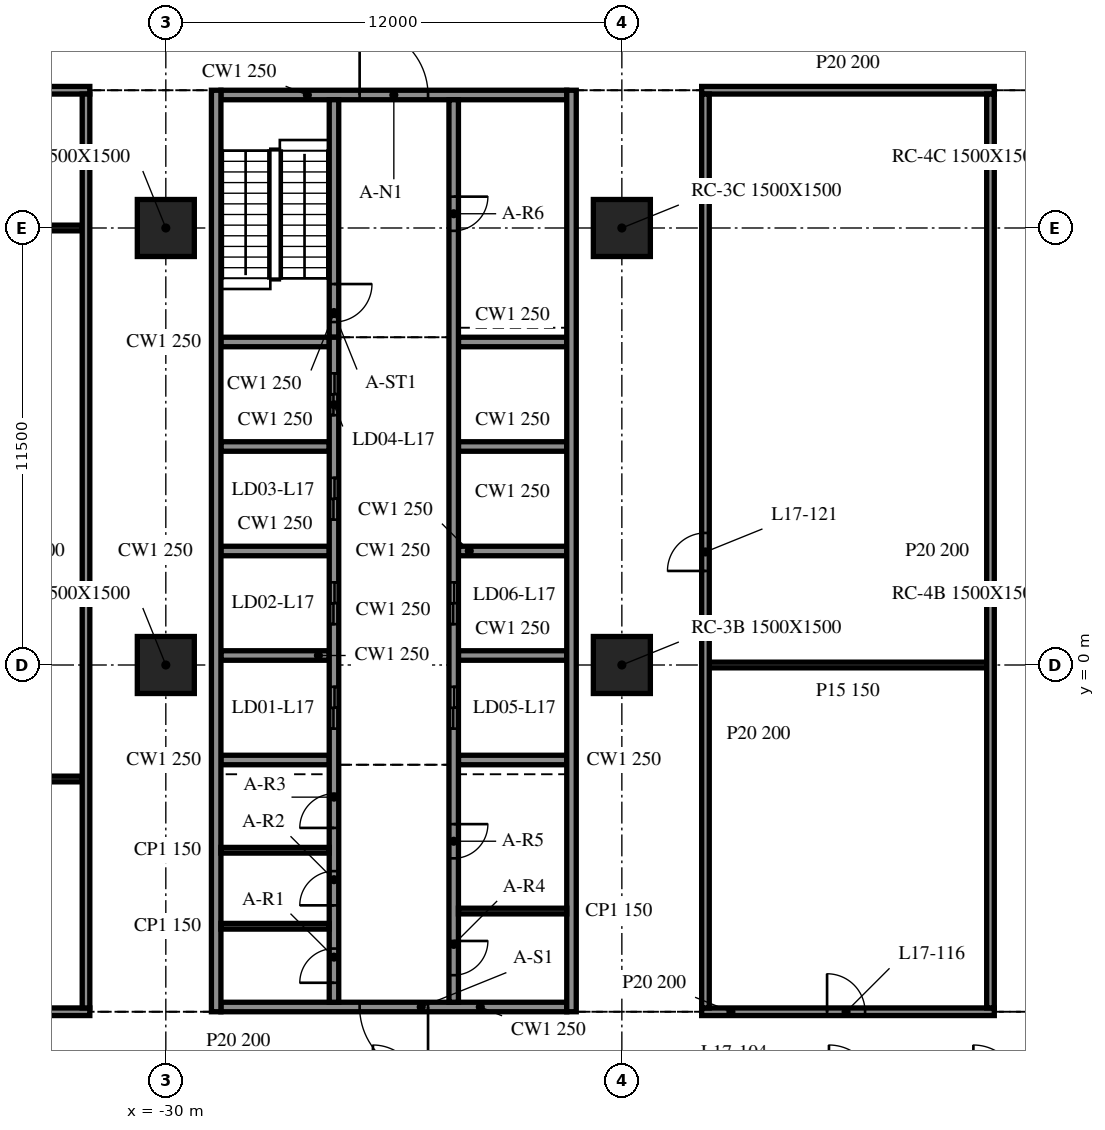
"""IFC4 building model, lengths in metres.
Left out: names, types, materials, properties, quantities, classifications, styles, units other than length and angle.
Written with IfcOpenShell. Run it as: python <this file> out.ifc"""

import sys

from ifc_helpers import new_model, si_unit, direction, frame, frame_2d, origin, origin_2d, place, context, subcontext, project, spatial, rectangle, extrude, element, fill, save


model = new_model("IFC4")
c1 = context("Model", 3, precision=1e-05, world=origin(), true_north=direction((0.0, 1.0)))
c2 = subcontext(c1, "Body", "Model", "MODEL_VIEW")
j1 = project(units=[si_unit("LENGTHUNIT", "METRE"), si_unit("PLANEANGLEUNIT", "RADIAN")], contexts=[c1])
p1 = place(None, origin())
s1 = spatial("IfcSite", under=j1, at=p1, CompositionType="ELEMENT")
p2 = place(p1, origin())
s2 = spatial("IfcBuilding", under=s1, at=p2, CompositionType="ELEMENT")
p3 = place(p2, frame((0.0, 0.0, 76.1)))
s3 = spatial("IfcBuildingStorey", under=s2, at=p3, CompositionType="ELEMENT", Elevation=76.1)
for number, where, z_axis, x_axis in (
    (1, (-30.0, 0.0, -0.34), (0.0, 0.0, 1.0), (1.0, 0.0, 0.0)),
    (2, (-30.0, 11.5, -0.34), (0.0, 0.0, 1.0), (1.0, 0.0, 0.0)),
    (3, (-18.0, 0.0, -0.34), (0.0, 0.0, 1.0), (1.0, 0.0, 0.0)),
    (4, (-18.0, 11.5, -0.34), (0.0, 0.0, 1.0), (1.0, 0.0, 0.0)),
):
    element("IfcColumn", number, at=place(p3, frame(where, z_axis=z_axis, x_axis=x_axis)), inside=s3, PredefinedType="COLUMN", context=c2, shape_type="SweptSolid", body=[
        extrude(rectangle(XDim=1.5, YDim=1.5, at=origin_2d()), origin(), (0.0, 0.0, 1.0), 4.09),
    ])
for number, where, z_axis, x_axis in (
    (5, (-28.675, 15.125, 0.0), (0.0, 0.0, 1.0), (0.0, -1.0, 0.0)),
    (6, (-19.325, -9.125, 0.0), (0.0, 0.0, 1.0), (0.0, 1.0, 0.0)),
):
    element("IfcWall", number, at=place(p3, frame(where, z_axis=z_axis, x_axis=x_axis)), inside=s3, PredefinedType="SOLIDWALL", context=c2, shape_type="SweptSolid", body=[
        extrude(rectangle(XDim=24.25, YDim=0.25, at=frame_2d((12.125, 0.0))), origin(), (0.0, 0.0, 1.0), 3.75),
    ])
p4 = place(p3, frame((-19.45, -9.0, 0.0), z_axis=(0.0, 0.0, 1.0), x_axis=(-1.0, 0.0, 0.0)))
e7 = element("IfcWall", 7, at=p4, inside=s3, PredefinedType="SOLIDWALL", context=c2, shape_type="SweptSolid", body=[
    extrude(rectangle(XDim=9.1, YDim=0.25, at=frame_2d((4.55, 0.0))), origin(), (0.0, 0.0, 1.0), 3.75),
])
p5 = place(p4, frame((3.65, 0.0, 0.0)))
e8 = element("IfcOpeningElement", 8, at=p5, cuts=e7, PredefinedType="OPENING", context=c2, shape_type="SweptSolid", body=[
    extrude(rectangle(XDim=1.8, YDim=2.1, at=frame_2d((0.9, 1.05))), frame((0.0, 0.135, 0.0), z_axis=(0.0, -1.0, 0.0), x_axis=(1.0, 0.0, 0.0)), (0.0, 0.0, 1.0), 0.27),
])
p6 = place(p3, frame((-28.55, 15.0, 0.0), z_axis=(0.0, 0.0, 1.0), x_axis=(1.0, 0.0, 0.0)))
e9 = element("IfcWall", 9, at=p6, inside=s3, PredefinedType="SOLIDWALL", context=c2, shape_type="SweptSolid", body=[
    extrude(rectangle(XDim=9.1, YDim=0.25, at=frame_2d((4.55, 0.0))), origin(), (0.0, 0.0, 1.0), 3.75),
])
p7 = place(p6, frame((3.65, 0.0, 0.0)))
e10 = element("IfcOpeningElement", 10, at=p7, cuts=e9, PredefinedType="OPENING", context=c2, shape_type="SweptSolid", body=[
    extrude(rectangle(XDim=1.8, YDim=2.1, at=frame_2d((0.9, 1.05))), frame((0.0, 0.135, 0.0), z_axis=(0.0, -1.0, 0.0), x_axis=(1.0, 0.0, 0.0)), (0.0, 0.0, 1.0), 0.27),
])
p8 = place(p3, frame((-25.575, -8.875, 0.0), z_axis=(0.0, 0.0, 1.0), x_axis=(0.0, 1.0, 0.0)))
e11 = element("IfcWall", 11, at=p8, inside=s3, PredefinedType="SOLIDWALL", context=c2, shape_type="SweptSolid", body=[
    extrude(rectangle(XDim=17.5, YDim=0.25, at=frame_2d((8.75, 0.0))), origin(), (0.0, 0.0, 1.0), 3.75),
])
p9 = place(p8, frame((7.2, 0.0, 0.0)))
e12 = element("IfcOpeningElement", 12, at=p9, cuts=e11, PredefinedType="OPENING", context=c2, shape_type="SweptSolid", body=[
    extrude(rectangle(XDim=1.1, YDim=2.1, at=frame_2d((0.55, 1.05))), frame((0.0, 0.135, 0.0), z_axis=(0.0, -1.0, 0.0), x_axis=(1.0, 0.0, 0.0)), (0.0, 0.0, 1.0), 0.27),
])
p10 = place(p8, frame((9.95, 0.0, 0.0)))
e13 = element("IfcOpeningElement", 13, at=p10, cuts=e11, PredefinedType="OPENING", context=c2, shape_type="SweptSolid", body=[
    extrude(rectangle(XDim=1.1, YDim=2.1, at=frame_2d((0.55, 1.05))), frame((0.0, 0.135, 0.0), z_axis=(0.0, -1.0, 0.0), x_axis=(1.0, 0.0, 0.0)), (0.0, 0.0, 1.0), 0.27),
])
p11 = place(p8, frame((12.7, 0.0, 0.0)))
e14 = element("IfcOpeningElement", 14, at=p11, cuts=e11, PredefinedType="OPENING", context=c2, shape_type="SweptSolid", body=[
    extrude(rectangle(XDim=1.1, YDim=2.1, at=frame_2d((0.55, 1.05))), frame((0.0, 0.135, 0.0), z_axis=(0.0, -1.0, 0.0), x_axis=(1.0, 0.0, 0.0)), (0.0, 0.0, 1.0), 0.27),
])
p12 = place(p8, frame((15.45, 0.0, 0.0)))
e15 = element("IfcOpeningElement", 15, at=p12, cuts=e11, PredefinedType="OPENING", context=c2, shape_type="SweptSolid", body=[
    extrude(rectangle(XDim=1.1, YDim=2.1, at=frame_2d((0.55, 1.05))), frame((0.0, 0.135, 0.0), z_axis=(0.0, -1.0, 0.0), x_axis=(1.0, 0.0, 0.0)), (0.0, 0.0, 1.0), 0.27),
])
p13 = place(p8, frame((0.512, 0.0, 0.0)))
e16 = element("IfcOpeningElement", 16, at=p13, cuts=e11, PredefinedType="OPENING", context=c2, shape_type="SweptSolid", body=[
    extrude(rectangle(XDim=0.9, YDim=2.1, at=frame_2d((0.45, 1.05))), frame((0.0, 0.135, 0.0), z_axis=(0.0, -1.0, 0.0), x_axis=(1.0, 0.0, 0.0)), (0.0, 0.0, 1.0), 0.27),
])
p14 = place(p8, frame((2.55, 0.0, 0.0)))
e17 = element("IfcOpeningElement", 17, at=p14, cuts=e11, PredefinedType="OPENING", context=c2, shape_type="SweptSolid", body=[
    extrude(rectangle(XDim=0.9, YDim=2.1, at=frame_2d((0.45, 1.05))), frame((0.0, 0.135, 0.0), z_axis=(0.0, -1.0, 0.0), x_axis=(1.0, 0.0, 0.0)), (0.0, 0.0, 1.0), 0.27),
])
p15 = place(p8, frame((4.587, 0.0, 0.0)))
e18 = element("IfcOpeningElement", 18, at=p15, cuts=e11, PredefinedType="OPENING", context=c2, shape_type="SweptSolid", body=[
    extrude(rectangle(XDim=0.9, YDim=2.1, at=frame_2d((0.45, 1.05))), frame((0.0, 0.135, 0.0), z_axis=(0.0, -1.0, 0.0), x_axis=(1.0, 0.0, 0.0)), (0.0, 0.0, 1.0), 0.27),
])
p16 = place(p3, frame((-25.575, 14.875, 0.0), z_axis=(0.0, 0.0, 1.0), x_axis=(0.0, -1.0, 0.0)))
e19 = element("IfcWall", 19, at=p16, inside=s3, PredefinedType="SOLIDWALL", context=c2, shape_type="SweptSolid", body=[
    extrude(rectangle(XDim=6.25, YDim=0.25, at=frame_2d((3.125, 0.0))), origin(), (0.0, 0.0, 1.0), 3.75),
])
p17 = place(p16, frame((4.85, 0.0, 0.0)))
e20 = element("IfcOpeningElement", 20, at=p17, cuts=e19, PredefinedType="OPENING", context=c2, shape_type="SweptSolid", body=[
    extrude(rectangle(XDim=1.0, YDim=2.1, at=frame_2d((0.5, 1.05))), frame((0.0, 0.135, 0.0), z_axis=(0.0, -1.0, 0.0), x_axis=(1.0, 0.0, 0.0)), (0.0, 0.0, 1.0), 0.27),
])
p18 = place(p3, frame((-22.425, 14.875, 0.0), z_axis=(0.0, 0.0, 1.0), x_axis=(0.0, -1.0, 0.0)))
e21 = element("IfcWall", 21, at=p18, inside=s3, PredefinedType="SOLIDWALL", context=c2, shape_type="SweptSolid", body=[
    extrude(rectangle(XDim=23.75, YDim=0.25, at=frame_2d((11.875, 0.0))), origin(), (0.0, 0.0, 1.0), 3.75),
])
p19 = place(p18, frame((15.45, 0.0, 0.0)))
e22 = element("IfcOpeningElement", 22, at=p19, cuts=e21, PredefinedType="OPENING", context=c2, shape_type="SweptSolid", body=[
    extrude(rectangle(XDim=1.1, YDim=2.1, at=frame_2d((0.55, 1.05))), frame((0.0, 0.135, 0.0), z_axis=(0.0, -1.0, 0.0), x_axis=(1.0, 0.0, 0.0)), (0.0, 0.0, 1.0), 0.27),
])
p20 = place(p18, frame((12.7, 0.0, 0.0)))
e23 = element("IfcOpeningElement", 23, at=p20, cuts=e21, PredefinedType="OPENING", context=c2, shape_type="SweptSolid", body=[
    extrude(rectangle(XDim=1.1, YDim=2.1, at=frame_2d((0.55, 1.05))), frame((0.0, 0.135, 0.0), z_axis=(0.0, -1.0, 0.0), x_axis=(1.0, 0.0, 0.0)), (0.0, 0.0, 1.0), 0.27),
])
p21 = place(p18, frame((22.137, 0.0, 0.0)))
e24 = element("IfcOpeningElement", 24, at=p21, cuts=e21, PredefinedType="OPENING", context=c2, shape_type="SweptSolid", body=[
    extrude(rectangle(XDim=0.9, YDim=2.1, at=frame_2d((0.45, 1.05))), frame((0.0, 0.135, 0.0), z_axis=(0.0, -1.0, 0.0), x_axis=(1.0, 0.0, 0.0)), (0.0, 0.0, 1.0), 0.27),
])
p22 = place(p18, frame((19.062, 0.0, 0.0)))
e25 = element("IfcOpeningElement", 25, at=p22, cuts=e21, PredefinedType="OPENING", context=c2, shape_type="SweptSolid", body=[
    extrude(rectangle(XDim=0.9, YDim=2.1, at=frame_2d((0.45, 1.05))), frame((0.0, 0.135, 0.0), z_axis=(0.0, -1.0, 0.0), x_axis=(1.0, 0.0, 0.0)), (0.0, 0.0, 1.0), 0.27),
])
p23 = place(p18, frame((2.55, 0.0, 0.0)))
e26 = element("IfcOpeningElement", 26, at=p23, cuts=e21, PredefinedType="OPENING", context=c2, shape_type="SweptSolid", body=[
    extrude(rectangle(XDim=0.9, YDim=2.1, at=frame_2d((0.45, 1.05))), frame((0.0, 0.135, 0.0), z_axis=(0.0, -1.0, 0.0), x_axis=(1.0, 0.0, 0.0)), (0.0, 0.0, 1.0), 0.27),
])
for number, where, z_axis, x_axis in (
    (27, (-28.55, -2.5, 0.0), (0.0, 0.0, 1.0), (1.0, 0.0, 0.0)),
    (28, (-28.55, 0.25, 0.0), (0.0, 0.0, 1.0), (1.0, 0.0, 0.0)),
    (29, (-28.55, 3.0, 0.0), (0.0, 0.0, 1.0), (1.0, 0.0, 0.0)),
    (30, (-28.55, 5.75, 0.0), (0.0, 0.0, 1.0), (1.0, 0.0, 0.0)),
    (31, (-28.55, 8.5, 0.0), (0.0, 0.0, 1.0), (1.0, 0.0, 0.0)),
    (32, (-22.3, -2.5, 0.0), (0.0, 0.0, 1.0), (1.0, 0.0, 0.0)),
    (33, (-22.3, 0.25, 0.0), (0.0, 0.0, 1.0), (1.0, 0.0, 0.0)),
    (34, (-22.3, 3.0, 0.0), (0.0, 0.0, 1.0), (1.0, 0.0, 0.0)),
    (35, (-22.3, 5.75, 0.0), (0.0, 0.0, 1.0), (1.0, 0.0, 0.0)),
    (36, (-22.3, 8.5, 0.0), (0.0, 0.0, 1.0), (1.0, 0.0, 0.0)),
):
    element("IfcWall", number, at=place(p3, frame(where, z_axis=z_axis, x_axis=x_axis)), inside=s3, PredefinedType="SOLIDWALL", context=c2, shape_type="SweptSolid", body=[
        extrude(rectangle(XDim=2.85, YDim=0.25, at=frame_2d((1.425, 0.0))), origin(), (0.0, 0.0, 1.0), 3.75),
    ])
for number, where, z_axis, x_axis in (
    (37, (-28.55, -6.875, 0.0), (0.0, 0.0, 1.0), (1.0, 0.0, 0.0)),
    (38, (-28.55, -4.875, 0.0), (0.0, 0.0, 1.0), (1.0, 0.0, 0.0)),
    (39, (-22.3, -6.475, 0.0), (0.0, 0.0, 1.0), (1.0, 0.0, 0.0)),
):
    element("IfcWall", number, at=place(p3, frame(where, z_axis=z_axis, x_axis=x_axis)), inside=s3, PredefinedType="PARTITIONING", context=c2, shape_type="SweptSolid", body=[
        extrude(rectangle(XDim=2.85, YDim=0.15, at=frame_2d((1.425, 0.0))), origin(), (0.0, 0.0, 1.0), 3.75),
    ])
p24 = place(p3, frame((-39.95, -9.125, 0.0), z_axis=(0.0, 0.0, 1.0), x_axis=(1.0, 0.0, 0.0)))
e40 = element("IfcWall", 40, at=p24, inside=s3, PredefinedType="PARTITIONING", context=c2, shape_type="SweptSolid", body=[
    extrude(rectangle(XDim=7.95, YDim=0.2, at=frame_2d((3.975, 0.0))), origin(), (0.0, 0.0, 1.0), 3.75),
])
p25 = place(p24, frame((3.3, 0.0, 0.0)))
e41 = element("IfcOpeningElement", 41, at=p25, cuts=e40, PredefinedType="OPENING", context=c2, shape_type="SweptSolid", body=[
    extrude(rectangle(XDim=1.2, YDim=2.1, at=frame_2d((0.6, 1.05))), frame((0.0, 0.11, 0.0), z_axis=(0.0, -1.0, 0.0), x_axis=(1.0, 0.0, 0.0)), (0.0, 0.0, 1.0), 0.22),
])
p26 = place(p3, frame((-15.9, -9.125, 0.0), z_axis=(0.0, 0.0, 1.0), x_axis=(1.0, 0.0, 0.0)))
e42 = element("IfcWall", 42, at=p26, inside=s3, PredefinedType="PARTITIONING", context=c2, shape_type="SweptSolid", body=[
    extrude(rectangle(XDim=7.7, YDim=0.2, at=frame_2d((3.85, 0.0))), origin(), (0.0, 0.0, 1.0), 3.75),
])
p27 = place(p26, frame((3.3, 0.0, 0.0)))
e43 = element("IfcOpeningElement", 43, at=p27, cuts=e42, PredefinedType="OPENING", context=c2, shape_type="SweptSolid", body=[
    extrude(rectangle(XDim=1.0, YDim=2.1, at=frame_2d((0.5, 1.05))), frame((0.0, 0.11, 0.0), z_axis=(0.0, -1.0, 0.0), x_axis=(1.0, 0.0, 0.0)), (0.0, 0.0, 1.0), 0.22),
])
p28 = place(p3, frame((-39.75, -3.0, 0.0), z_axis=(0.0, 0.0, 1.0), x_axis=(1.0, 0.0, 0.0)))
e44 = element("IfcWall", 44, at=p28, inside=s3, PredefinedType="PARTITIONING", context=c2, shape_type="SweptSolid", body=[
    extrude(rectangle(XDim=7.55, YDim=0.15, at=frame_2d((3.775, 0.0))), origin(), (0.0, 0.0, 1.0), 3.75),
])
p29 = place(p3, frame((-15.7, 0.0, 0.0), z_axis=(0.0, 0.0, 1.0), x_axis=(1.0, 0.0, 0.0)))
e45 = element("IfcWall", 45, at=p29, inside=s3, PredefinedType="PARTITIONING", context=c2, shape_type="SweptSolid", body=[
    extrude(rectangle(XDim=7.3, YDim=0.15, at=frame_2d((3.65, 0.0))), origin(), (0.0, 0.0, 1.0), 3.75),
])
p30 = place(p3, frame((-39.75, 11.5, 0.0), z_axis=(0.0, 0.0, 1.0), x_axis=(1.0, 0.0, 0.0)))
e46 = element("IfcWall", 46, at=p30, inside=s3, PredefinedType="PARTITIONING", context=c2, shape_type="SweptSolid", body=[
    extrude(rectangle(XDim=7.55, YDim=0.15, at=frame_2d((3.775, 0.0))), origin(), (0.0, 0.0, 1.0), 3.75),
])
p31 = place(p3, frame((-39.95, 15.125, 0.0), z_axis=(0.0, 0.0, 1.0), x_axis=(1.0, 0.0, 0.0)))
e47 = element("IfcWall", 47, at=p31, inside=s3, PredefinedType="PARTITIONING", context=c2, shape_type="SweptSolid", body=[
    extrude(rectangle(XDim=7.95, YDim=0.2, at=frame_2d((3.975, 0.0))), origin(), (0.0, 0.0, 1.0), 3.75),
])
p32 = place(p31, frame((3.5, 0.0, 0.0)))
e48 = element("IfcOpeningElement", 48, at=p32, cuts=e47, PredefinedType="OPENING", context=c2, shape_type="SweptSolid", body=[
    extrude(rectangle(XDim=1.0, YDim=2.1, at=frame_2d((0.5, 1.05))), frame((0.0, 0.11, 0.0), z_axis=(0.0, -1.0, 0.0), x_axis=(1.0, 0.0, 0.0)), (0.0, 0.0, 1.0), 0.22),
])
p33 = place(p3, frame((-15.9, 15.125, 0.0), z_axis=(0.0, 0.0, 1.0), x_axis=(1.0, 0.0, 0.0)))
e49 = element("IfcWall", 49, at=p33, inside=s3, PredefinedType="PARTITIONING", context=c2, shape_type="SweptSolid", body=[
    extrude(rectangle(XDim=7.7, YDim=0.2, at=frame_2d((3.85, 0.0))), origin(), (0.0, 0.0, 1.0), 3.75),
])
p34 = place(p3, frame((-32.1, -9.025, 0.0), z_axis=(0.0, 0.0, 1.0), x_axis=(0.0, 1.0, 0.0)))
e50 = element("IfcWall", 50, at=p34, inside=s3, PredefinedType="PARTITIONING", context=c2, shape_type="SweptSolid", body=[
    extrude(rectangle(XDim=24.05, YDim=0.2, at=frame_2d((12.025, 0.0))), origin(), (0.0, 0.0, 1.0), 3.75),
])
p35 = place(p3, frame((-15.8, -9.025, 0.0), z_axis=(0.0, 0.0, 1.0), x_axis=(0.0, 1.0, 0.0)))
e51 = element("IfcWall", 51, at=p35, inside=s3, PredefinedType="PARTITIONING", context=c2, shape_type="SweptSolid", body=[
    extrude(rectangle(XDim=24.05, YDim=0.2, at=frame_2d((12.025, 0.0))), origin(), (0.0, 0.0, 1.0), 3.75),
])
p36 = place(p35, frame((11.5, 0.0, 0.0)))
e52 = element("IfcOpeningElement", 52, at=p36, cuts=e51, PredefinedType="OPENING", context=c2, shape_type="SweptSolid", body=[
    extrude(rectangle(XDim=1.0, YDim=2.1, at=frame_2d((0.5, 1.05))), frame((0.0, 0.11, 0.0), z_axis=(0.0, -1.0, 0.0), x_axis=(1.0, 0.0, 0.0)), (0.0, 0.0, 1.0), 0.22),
])
p37 = place(p3, frame((-8.3, -9.025, 0.0), z_axis=(0.0, 0.0, 1.0), x_axis=(0.0, 1.0, 0.0)))
e53 = element("IfcWall", 53, at=p37, inside=s3, PredefinedType="PARTITIONING", context=c2, shape_type="SweptSolid", body=[
    extrude(rectangle(XDim=24.05, YDim=0.2, at=frame_2d((12.025, 0.0))), origin(), (0.0, 0.0, 1.0), 3.75),
])
p38 = place(p5, origin())
e54 = element("IfcDoor", 54, at=p38, inside=s3, OperationType="DOUBLE_DOOR_SINGLE_SWING", PredefinedType="DOOR", context=c2, shape_type="SweptSolid", body=[
    extrude(rectangle(XDim=1.8, YDim=2.1, at=frame_2d((0.9, 1.05))), frame((0.0, 0.025, 0.0), z_axis=(0.0, -1.0, 0.0), x_axis=(1.0, 0.0, 0.0)), (0.0, 0.0, 1.0), 0.05),
])
fill(e8, e54)
p39 = place(p7, origin())
e55 = element("IfcDoor", 55, at=p39, inside=s3, OperationType="DOUBLE_DOOR_SINGLE_SWING", PredefinedType="DOOR", context=c2, shape_type="SweptSolid", body=[
    extrude(rectangle(XDim=1.8, YDim=2.1, at=frame_2d((0.9, 1.05))), frame((0.0, 0.025, 0.0), z_axis=(0.0, -1.0, 0.0), x_axis=(1.0, 0.0, 0.0)), (0.0, 0.0, 1.0), 0.05),
])
fill(e10, e55)
p40 = place(p19, origin())
e56 = element("IfcDoor", 56, at=p40, inside=s3, OperationType="DOUBLE_DOOR_SLIDING", PredefinedType="DOOR", context=c2, shape_type="SweptSolid", body=[
    extrude(rectangle(XDim=1.1, YDim=2.1, at=frame_2d((0.55, 1.05))), frame((0.0, 0.025, 0.0), z_axis=(0.0, -1.0, 0.0), x_axis=(1.0, 0.0, 0.0)), (0.0, 0.0, 1.0), 0.05),
])
fill(e22, e56)
p41 = place(p20, origin())
e57 = element("IfcDoor", 57, at=p41, inside=s3, OperationType="DOUBLE_DOOR_SLIDING", PredefinedType="DOOR", context=c2, shape_type="SweptSolid", body=[
    extrude(rectangle(XDim=1.1, YDim=2.1, at=frame_2d((0.55, 1.05))), frame((0.0, 0.025, 0.0), z_axis=(0.0, -1.0, 0.0), x_axis=(1.0, 0.0, 0.0)), (0.0, 0.0, 1.0), 0.05),
])
fill(e23, e57)
p42 = place(p9, origin())
e58 = element("IfcDoor", 58, at=p42, inside=s3, OperationType="DOUBLE_DOOR_SLIDING", PredefinedType="DOOR", context=c2, shape_type="SweptSolid", body=[
    extrude(rectangle(XDim=1.1, YDim=2.1, at=frame_2d((0.55, 1.05))), frame((0.0, 0.025, 0.0), z_axis=(0.0, -1.0, 0.0), x_axis=(1.0, 0.0, 0.0)), (0.0, 0.0, 1.0), 0.05),
])
fill(e12, e58)
p43 = place(p10, origin())
e59 = element("IfcDoor", 59, at=p43, inside=s3, OperationType="DOUBLE_DOOR_SLIDING", PredefinedType="DOOR", context=c2, shape_type="SweptSolid", body=[
    extrude(rectangle(XDim=1.1, YDim=2.1, at=frame_2d((0.55, 1.05))), frame((0.0, 0.025, 0.0), z_axis=(0.0, -1.0, 0.0), x_axis=(1.0, 0.0, 0.0)), (0.0, 0.0, 1.0), 0.05),
])
fill(e13, e59)
p44 = place(p11, origin())
e60 = element("IfcDoor", 60, at=p44, inside=s3, OperationType="DOUBLE_DOOR_SLIDING", PredefinedType="DOOR", context=c2, shape_type="SweptSolid", body=[
    extrude(rectangle(XDim=1.1, YDim=2.1, at=frame_2d((0.55, 1.05))), frame((0.0, 0.025, 0.0), z_axis=(0.0, -1.0, 0.0), x_axis=(1.0, 0.0, 0.0)), (0.0, 0.0, 1.0), 0.05),
])
fill(e14, e60)
p45 = place(p12, origin())
e61 = element("IfcDoor", 61, at=p45, inside=s3, OperationType="DOUBLE_DOOR_SLIDING", PredefinedType="DOOR", context=c2, shape_type="SweptSolid", body=[
    extrude(rectangle(XDim=1.1, YDim=2.1, at=frame_2d((0.55, 1.05))), frame((0.0, 0.025, 0.0), z_axis=(0.0, -1.0, 0.0), x_axis=(1.0, 0.0, 0.0)), (0.0, 0.0, 1.0), 0.05),
])
fill(e15, e61)
p46 = place(p13, origin())
e62 = element("IfcDoor", 62, at=p46, inside=s3, OperationType="SINGLE_SWING_LEFT", PredefinedType="DOOR", context=c2, shape_type="SweptSolid", body=[
    extrude(rectangle(XDim=0.9, YDim=2.1, at=frame_2d((0.45, 1.05))), frame((0.0, 0.025, 0.0), z_axis=(0.0, -1.0, 0.0), x_axis=(1.0, 0.0, 0.0)), (0.0, 0.0, 1.0), 0.05),
])
fill(e16, e62)
p47 = place(p14, origin())
e63 = element("IfcDoor", 63, at=p47, inside=s3, OperationType="SINGLE_SWING_RIGHT", PredefinedType="DOOR", context=c2, shape_type="SweptSolid", body=[
    extrude(rectangle(XDim=0.9, YDim=2.1, at=frame_2d((0.45, 1.05))), frame((0.0, 0.025, 0.0), z_axis=(0.0, -1.0, 0.0), x_axis=(1.0, 0.0, 0.0)), (0.0, 0.0, 1.0), 0.05),
])
fill(e17, e63)
p48 = place(p15, origin())
e64 = element("IfcDoor", 64, at=p48, inside=s3, OperationType="SINGLE_SWING_LEFT", PredefinedType="DOOR", context=c2, shape_type="SweptSolid", body=[
    extrude(rectangle(XDim=0.9, YDim=2.1, at=frame_2d((0.45, 1.05))), frame((0.0, 0.025, 0.0), z_axis=(0.0, -1.0, 0.0), x_axis=(1.0, 0.0, 0.0)), (0.0, 0.0, 1.0), 0.05),
])
fill(e18, e64)
p49 = place(p21, origin())
e65 = element("IfcDoor", 65, at=p49, inside=s3, OperationType="SINGLE_SWING_RIGHT", PredefinedType="DOOR", context=c2, shape_type="SweptSolid", body=[
    extrude(rectangle(XDim=0.9, YDim=2.1, at=frame_2d((0.45, 1.05))), frame((0.0, 0.025, 0.0), z_axis=(0.0, -1.0, 0.0), x_axis=(1.0, 0.0, 0.0)), (0.0, 0.0, 1.0), 0.05),
])
fill(e24, e65)
p50 = place(p22, origin())
e66 = element("IfcDoor", 66, at=p50, inside=s3, OperationType="SINGLE_SWING_LEFT", PredefinedType="DOOR", context=c2, shape_type="SweptSolid", body=[
    extrude(rectangle(XDim=0.9, YDim=2.1, at=frame_2d((0.45, 1.05))), frame((0.0, 0.025, 0.0), z_axis=(0.0, -1.0, 0.0), x_axis=(1.0, 0.0, 0.0)), (0.0, 0.0, 1.0), 0.05),
])
fill(e25, e66)
p51 = place(p23, origin())
e67 = element("IfcDoor", 67, at=p51, inside=s3, OperationType="SINGLE_SWING_RIGHT", PredefinedType="DOOR", context=c2, shape_type="SweptSolid", body=[
    extrude(rectangle(XDim=0.9, YDim=2.1, at=frame_2d((0.45, 1.05))), frame((0.0, 0.025, 0.0), z_axis=(0.0, -1.0, 0.0), x_axis=(1.0, 0.0, 0.0)), (0.0, 0.0, 1.0), 0.05),
])
fill(e26, e67)
p52 = place(p17, origin())
e68 = element("IfcDoor", 68, at=p52, inside=s3, OperationType="SINGLE_SWING_LEFT", PredefinedType="DOOR", context=c2, shape_type="SweptSolid", body=[
    extrude(rectangle(XDim=1.0, YDim=2.1, at=frame_2d((0.5, 1.05))), frame((0.0, 0.025, 0.0), z_axis=(0.0, -1.0, 0.0), x_axis=(1.0, 0.0, 0.0)), (0.0, 0.0, 1.0), 0.05),
])
fill(e20, e68)
p53 = place(p27, origin())
e69 = element("IfcDoor", 69, at=p53, inside=s3, OperationType="SINGLE_SWING_LEFT", PredefinedType="DOOR", context=c2, shape_type="SweptSolid", body=[
    extrude(rectangle(XDim=1.0, YDim=2.1, at=frame_2d((0.5, 1.05))), frame((0.0, 0.025, 0.0), z_axis=(0.0, -1.0, 0.0), x_axis=(1.0, 0.0, 0.0)), (0.0, 0.0, 1.0), 0.05),
])
fill(e43, e69)
p54 = place(p36, origin())
e70 = element("IfcDoor", 70, at=p54, inside=s3, OperationType="SINGLE_SWING_RIGHT", PredefinedType="DOOR", context=c2, shape_type="SweptSolid", body=[
    extrude(rectangle(XDim=1.0, YDim=2.1, at=frame_2d((0.5, 1.05))), frame((0.0, 0.025, 0.0), z_axis=(0.0, -1.0, 0.0), x_axis=(1.0, 0.0, 0.0)), (0.0, 0.0, 1.0), 0.05),
])
fill(e52, e70)
save(model, sys.argv[1])
